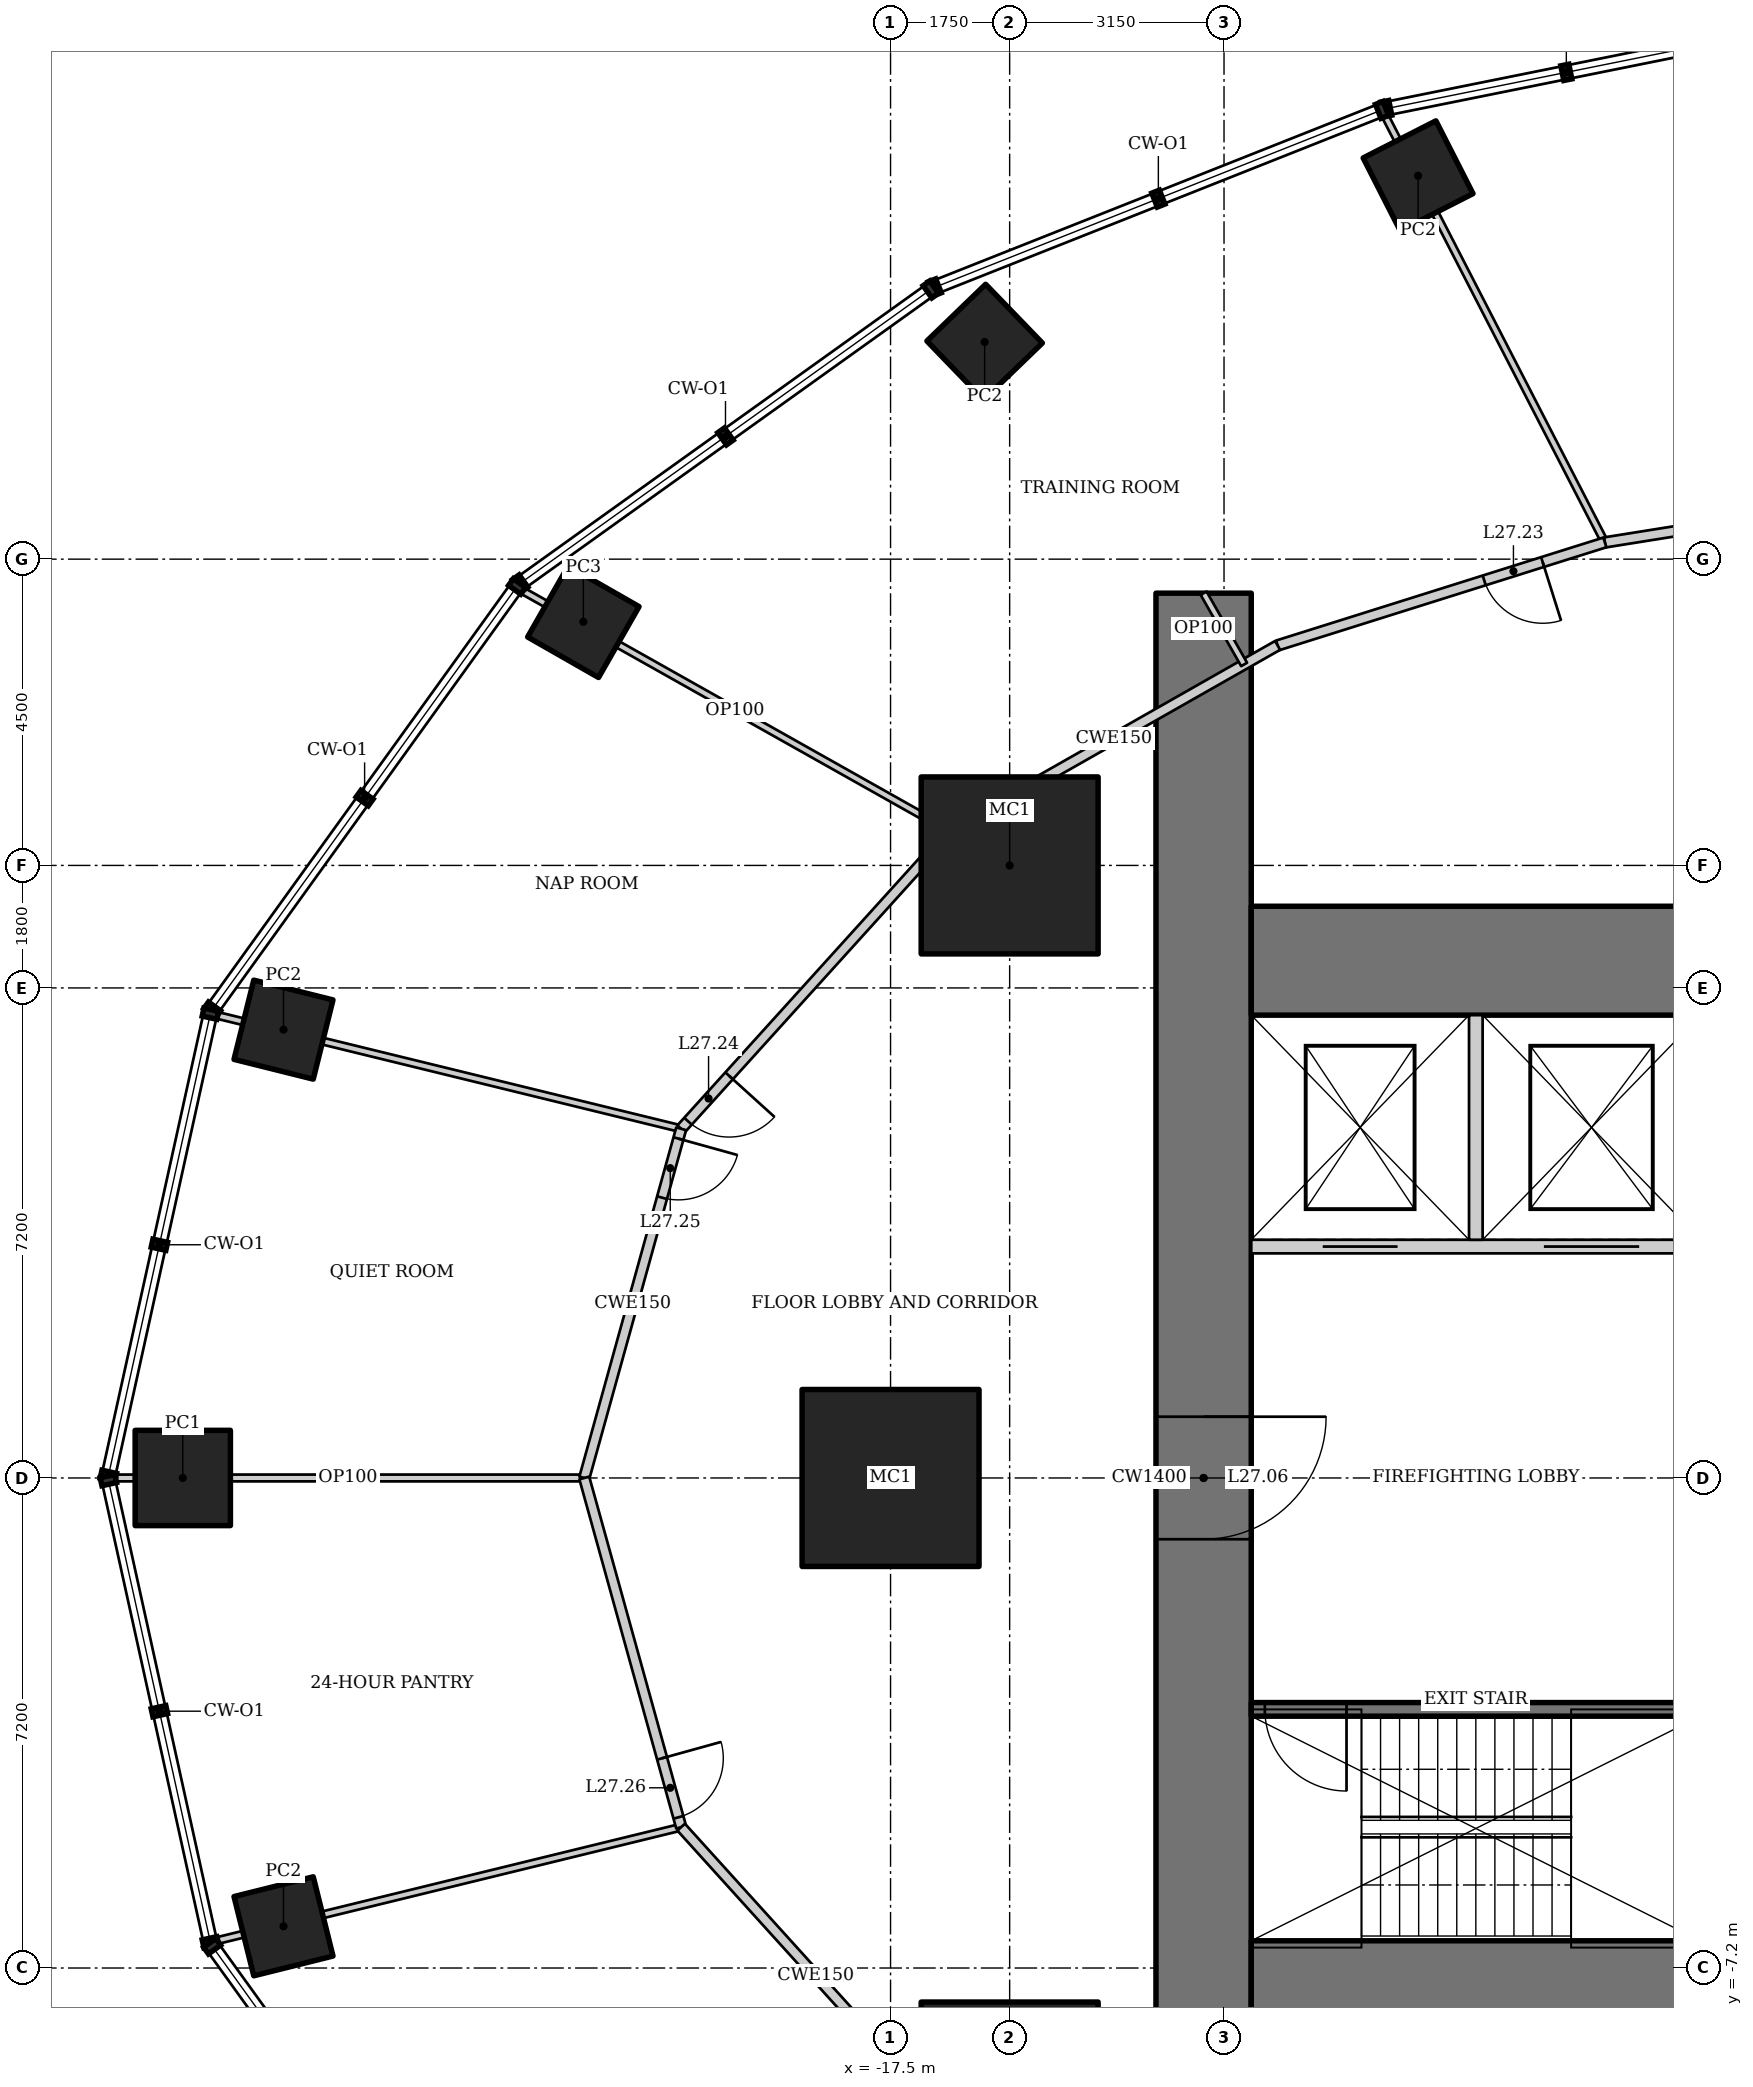
"""IFC4 building model, lengths in metres.
Left out: names, types, materials, properties, quantities, classifications, styles, units other than length and angle.
Written with IfcOpenShell. Run it as: python <this file> out.ifc"""

import sys

from ifc_helpers import new_model, si_unit, direction, frame, frame_2d, origin, origin_2d, place, context, subcontext, project, spatial, rectangle, hollow_rectangle, extrude, element, fill, save


model = new_model("IFC4")
c1 = context("Model", 3, precision=1e-05, world=origin(), true_north=direction((0.0, 1.0)))
c2 = subcontext(c1, "Body", "Model", "MODEL_VIEW")
j1 = project(units=[si_unit("LENGTHUNIT", "METRE"), si_unit("PLANEANGLEUNIT", "RADIAN")], contexts=[c1])
p1 = place(None, origin())
s1 = spatial("IfcSite", under=j1, at=p1, CompositionType="ELEMENT")
p2 = place(p1, origin())
s2 = spatial("IfcBuilding", under=s1, at=p2, CompositionType="ELEMENT")
p3 = place(p2, frame((0.0, 0.0, 117.4)))
s3 = spatial("IfcBuildingStorey", under=s2, at=p3, CompositionType="ELEMENT", Elevation=117.4)
for number, where, z_axis, x_axis in (
    (1, (-15.75, 9.0, 0.0), (0.0, 0.0, 1.0), (1.0, 0.0, 0.0)),
    (2, (-17.5, 0.0, 0.0), (0.0, 0.0, 1.0), (1.0, 0.0, 0.0)),
    (3, (-15.75, -9.0, 0.0), (0.0, 0.0, 1.0), (1.0, 0.0, 0.0)),
):
    element("IfcColumn", number, at=place(p3, frame(where, z_axis=z_axis, x_axis=x_axis)), inside=s3, PredefinedType="COLUMN", context=c2, shape_type="SweptSolid", body=[
        extrude(hollow_rectangle(XDim=2.6, YDim=2.6, WallThickness=0.13, at=origin_2d()), origin(), (0.0, 0.0, 1.0), 4.2),
    ])
for number, where, z_axis, x_axis in (
    (4, (-9.749, 19.133, 0.0), (0.0, 0.0, 1.0), (0.891, 0.454, 0.0)),
    (5, (-16.118, 16.69, 0.0), (0.0, 0.0, 1.0), (0.719, 0.695, 0.0)),
):
    element("IfcColumn", number, at=place(p3, frame(where, z_axis=z_axis, x_axis=x_axis)), inside=s3, PredefinedType="COLUMN", context=c2, shape_type="SweptSolid", body=[
        extrude(hollow_rectangle(XDim=1.2, YDim=1.2, WallThickness=0.1, at=origin_2d()), origin(), (0.0, 0.0, 1.0), 4.2),
    ])
p4 = place(p3, frame((-22.014, 12.579, 0.0), z_axis=(0.0, 0.0, 1.0), x_axis=(0.496139221777, 0.86824298017, 0.0)))
e6 = element("IfcColumn", 6, at=p4, inside=s3, PredefinedType="COLUMN", context=c2, shape_type="SweptSolid", body=[
    extrude(hollow_rectangle(XDim=1.2, YDim=1.2, WallThickness=0.12, at=origin_2d()), origin(), (0.0, 0.0, 1.0), 4.2),
])
p5 = place(p3, frame((-26.42, 6.587, 0.0), z_axis=(0.0, 0.0, 1.0), x_axis=(0.2419218956, 0.970295726276, 0.0)))
e7 = element("IfcColumn", 7, at=p5, inside=s3, PredefinedType="COLUMN", context=c2, shape_type="SweptSolid", body=[
    extrude(hollow_rectangle(XDim=1.2, YDim=1.2, WallThickness=0.1, at=origin_2d()), origin(), (0.0, 0.0, 1.0), 4.2),
])
p6 = place(p3, frame((-27.9, 0.0, 0.0), z_axis=(0.0, 0.0, 1.0), x_axis=(1.0, 0.0, 0.0)))
e8 = element("IfcColumn", 8, at=p6, inside=s3, PredefinedType="COLUMN", context=c2, shape_type="SweptSolid", body=[
    extrude(hollow_rectangle(XDim=1.4, YDim=1.4, WallThickness=0.1, at=origin_2d()), origin(), (0.0, 0.0, 1.0), 4.2),
])
p7 = place(p3, frame((-26.42, -6.587, 0.0), z_axis=(0.0, 0.0, 1.0), x_axis=(0.970295726276, 0.2419218956, 0.0)))
e9 = element("IfcColumn", 9, at=p7, inside=s3, PredefinedType="COLUMN", context=c2, shape_type="SweptSolid", body=[
    extrude(hollow_rectangle(XDim=1.2, YDim=1.2, WallThickness=0.1, at=origin_2d()), origin(), (0.0, 0.0, 1.0), 4.2),
])
p8 = place(p3, frame((-12.9, 13.0, 0.0), z_axis=(0.0, 0.0, 1.0), x_axis=(0.0, -1.0, 0.0)))
e10 = element("IfcWall", 10, at=p8, inside=s3, PredefinedType="SHEAR", context=c2, shape_type="SweptSolid", body=[
    extrude(rectangle(XDim=26.0, YDim=1.4, at=frame_2d((13.0, 0.0))), origin(), (0.0, 0.0, 1.0), 4.2),
])
p9 = place(p8, frame((12.1, 0.0, 0.0)))
e11 = element("IfcOpeningElement", 11, at=p9, cuts=e10, PredefinedType="OPENING", context=c2, shape_type="SweptSolid", body=[
    extrude(rectangle(XDim=1.8, YDim=2.1, at=frame_2d((0.9, 1.05))), frame((0.0, 0.71, 0.0), z_axis=(0.0, -1.0, 0.0), x_axis=(1.0, 0.0, 0.0)), (0.0, 0.0, 1.0), 1.42),
])
for number, where, z_axis, x_axis in (
    (12, (-12.2, -7.6, 0.0), (0.0, 0.0, 1.0), (1.0, 0.0, 0.0)),
    (13, (12.2, 7.6, 0.0), (0.0, 0.0, 1.0), (-1.0, 0.0, 0.0)),
):
    element("IfcWall", number, at=place(p3, frame(where, z_axis=z_axis, x_axis=x_axis)), inside=s3, PredefinedType="SHEAR", context=c2, shape_type="SweptSolid", body=[
        extrude(rectangle(XDim=24.4, YDim=1.6, at=frame_2d((12.2, 0.0))), origin(), (0.0, 0.0, 1.0), 4.2),
    ])
p10 = place(p3, frame((-5.6, -3.4, 0.0), z_axis=(0.0, 0.0, 1.0), x_axis=(-1.0, 0.0, 0.0)))
e14 = element("IfcWall", 14, at=p10, inside=s3, PredefinedType="SHEAR", context=c2, shape_type="SweptSolid", body=[
    extrude(rectangle(XDim=6.6, YDim=0.2, at=frame_2d((3.3, 0.0))), origin(), (0.0, 0.0, 1.0), 4.2),
])
p11 = place(p10, frame((5.2, 0.0, 0.0)))
e15 = element("IfcOpeningElement", 15, at=p11, cuts=e14, PredefinedType="OPENING", context=c2, shape_type="SweptSolid", body=[
    extrude(rectangle(XDim=1.2, YDim=2.1, at=frame_2d((0.6, 1.05))), frame((0.0, 0.11, 0.0), z_axis=(0.0, -1.0, 0.0), x_axis=(1.0, 0.0, 0.0)), (0.0, 0.0, 1.0), 0.22),
])
p12 = place(p3, frame((-12.2, 3.4, 0.0), z_axis=(0.0, 0.0, 1.0), x_axis=(1.0, 0.0, 0.0)))
e16 = element("IfcWall", 16, at=p12, inside=s3, PredefinedType="SOLIDWALL", context=c2, shape_type="SweptSolid", body=[
    extrude(rectangle(XDim=6.6, YDim=0.2, at=frame_2d((3.3, 0.0))), origin(), (0.0, 0.0, 1.0), 4.2),
])
p13 = place(p12, frame((1.05, 0.0, 0.0)))
e17 = element("IfcOpeningElement", 17, at=p13, cuts=e16, PredefinedType="OPENING", context=c2, shape_type="SweptSolid", body=[
    extrude(rectangle(XDim=1.1, YDim=2.2, at=frame_2d((0.55, 1.1))), frame((0.0, 0.11, 0.0), z_axis=(0.0, -1.0, 0.0), x_axis=(1.0, 0.0, 0.0)), (0.0, 0.0, 1.0), 0.22),
])
p14 = place(p12, frame((4.3, 0.0, 0.0)))
e18 = element("IfcOpeningElement", 18, at=p14, cuts=e16, PredefinedType="OPENING", context=c2, shape_type="SweptSolid", body=[
    extrude(rectangle(XDim=1.4, YDim=2.2, at=frame_2d((0.7, 1.1))), frame((0.0, 0.11, 0.0), z_axis=(0.0, -1.0, 0.0), x_axis=(1.0, 0.0, 0.0)), (0.0, 0.0, 1.0), 0.22),
])
p15 = place(p3, frame((-8.9, 3.5, 0.0), z_axis=(0.0, 0.0, 1.0), x_axis=(0.0, 1.0, 0.0)))
e19 = element("IfcWall", 19, at=p15, inside=s3, PredefinedType="SOLIDWALL", context=c2, shape_type="SweptSolid", body=[
    extrude(rectangle(XDim=3.3, YDim=0.2, at=frame_2d((1.65, 0.0))), origin(), (0.0, 0.0, 1.0), 4.2),
])
p16 = place(p3, frame((-10.253, 20.052, 0.0), z_axis=(0.0, 0.0, 1.0), x_axis=(0.458082677592, -0.888909590729, 0.0)))
e20 = element("IfcWall", 20, at=p16, inside=s3, PredefinedType="PARTITIONING", context=c2, shape_type="SweptSolid", body=[
    extrude(rectangle(XDim=7.094, YDim=0.1, at=frame_2d((3.547, 0.0))), origin(), (0.0, 0.0, 1.0), 3.349),
])
p17 = place(p3, frame((-22.949, 13.059, 0.0), z_axis=(0.0, 0.0, 1.0), x_axis=(0.871483913002, -0.490424091352, 0.0)))
e21 = element("IfcWall", 21, at=p17, inside=s3, PredefinedType="PARTITIONING", context=c2, shape_type="SweptSolid", body=[
    extrude(rectangle(XDim=7.26, YDim=0.1, at=frame_2d((3.63, 0.0))), origin(), (0.0, 0.0, 1.0), 3.451),
])
p18 = place(p3, frame((-27.441, 6.809, 0.0), z_axis=(0.0, 0.0, 1.0), x_axis=(0.971377572955, -0.237540755996, 0.0)))
e22 = element("IfcWall", 22, at=p18, inside=s3, PredefinedType="PARTITIONING", context=c2, shape_type="SweptSolid", body=[
    extrude(rectangle(XDim=7.066, YDim=0.1, at=frame_2d((3.533, 0.0))), origin(), (0.0, 0.0, 1.0), 3.113),
])
p19 = place(p3, frame((-28.944, 0.0, 0.0), z_axis=(0.0, 0.0, 1.0), x_axis=(1.0, 0.0, 0.0)))
e23 = element("IfcWall", 23, at=p19, inside=s3, PredefinedType="PARTITIONING", context=c2, shape_type="SweptSolid", body=[
    extrude(rectangle(XDim=6.944, YDim=0.1, at=frame_2d((3.472, 0.0))), origin(), (0.0, 0.0, 1.0), 3.204),
])
p20 = place(p3, frame((-27.441, -6.809, 0.0), z_axis=(0.0, 0.0, 1.0), x_axis=(0.971377572955, 0.237540755996, 0.0)))
e24 = element("IfcWall", 24, at=p20, inside=s3, PredefinedType="PARTITIONING", context=c2, shape_type="SweptSolid", body=[
    extrude(rectangle(XDim=7.066, YDim=0.1, at=frame_2d((3.533, 0.0))), origin(), (0.0, 0.0, 1.0), 3.113),
])
p21 = place(p3, frame((-3.31, 14.335, 0.0), z_axis=(0.0, 0.0, 1.0), x_axis=(-0.987511396594, -0.157547585181, 0.0)))
e25 = element("IfcWall", 25, at=p21, inside=s3, PredefinedType="PARTITIONING", context=c2, shape_type="SweptSolid", body=[
    extrude(rectangle(XDim=3.741, YDim=0.15, at=frame_2d((1.87, 0.0))), origin(), (0.0, 0.0, 1.0), 4.05),
])
p22 = place(p3, frame((-7.004, 13.746, 0.0), z_axis=(0.0, 0.0, 1.0), x_axis=(-0.953893934057, -0.300143903101, 0.0)))
e26 = element("IfcWall", 26, at=p22, inside=s3, PredefinedType="PARTITIONING", context=c2, shape_type="SweptSolid", body=[
    extrude(rectangle(XDim=5.042, YDim=0.15, at=frame_2d((2.521, 0.0))), origin(), (0.0, 0.0, 1.0), 4.05),
])
p23 = place(p22, frame((0.959, 0.0, 0.0)))
e27 = element("IfcOpeningElement", 27, at=p23, cuts=e26, PredefinedType="OPENING", context=c2, shape_type="SweptSolid", body=[
    extrude(rectangle(XDim=0.9, YDim=2.1, at=frame_2d((0.45, 1.05))), frame((0.0, 0.085, 0.0), z_axis=(0.0, -1.0, 0.0), x_axis=(1.0, 0.0, 0.0)), (0.0, 0.0, 1.0), 0.17),
])
p24 = place(p3, frame((-11.813, 12.232, 0.0), z_axis=(0.0, 0.0, 1.0), x_axis=(-0.869375991036, -0.494151177485, 0.0)))
e28 = element("IfcWall", 28, at=p24, inside=s3, PredefinedType="PARTITIONING", context=c2, shape_type="SweptSolid", body=[
    extrude(rectangle(XDim=5.532, YDim=0.15, at=frame_2d((2.766, 0.0))), origin(), (0.0, 0.0, 1.0), 4.05),
])
p25 = place(p3, frame((-16.623, 9.499, 0.0), z_axis=(0.0, 0.0, 1.0), x_axis=(-0.671118353743, -0.741350224435, 0.0)))
e29 = element("IfcWall", 29, at=p25, inside=s3, PredefinedType="PARTITIONING", context=c2, shape_type="SweptSolid", body=[
    extrude(rectangle(XDim=5.892, YDim=0.15, at=frame_2d((2.946, 0.0))), origin(), (0.0, 0.0, 1.0), 4.05),
])
p26 = place(p25, frame((4.842, 0.0, 0.0)))
e30 = element("IfcOpeningElement", 30, at=p26, cuts=e29, PredefinedType="OPENING", context=c2, shape_type="SweptSolid", body=[
    extrude(rectangle(XDim=0.9, YDim=2.1, at=frame_2d((0.45, 1.05))), frame((0.0, 0.085, 0.0), z_axis=(0.0, -1.0, 0.0), x_axis=(1.0, 0.0, 0.0)), (0.0, 0.0, 1.0), 0.17),
])
p27 = place(p3, frame((-20.577, 5.13, 0.0), z_axis=(0.0, 0.0, 1.0), x_axis=(-0.267293817428, -0.963615076244, 0.0)))
e31 = element("IfcWall", 31, at=p27, inside=s3, PredefinedType="PARTITIONING", context=c2, shape_type="SweptSolid", body=[
    extrude(rectangle(XDim=5.324, YDim=0.15, at=frame_2d((2.662, 0.0))), origin(), (0.0, 0.0, 1.0), 4.05),
])
p28 = place(p27, frame((0.15, 0.0, 0.0)))
e32 = element("IfcOpeningElement", 32, at=p28, cuts=e31, PredefinedType="OPENING", context=c2, shape_type="SweptSolid", body=[
    extrude(rectangle(XDim=0.9, YDim=2.1, at=frame_2d((0.45, 1.05))), frame((0.0, 0.085, 0.0), z_axis=(0.0, -1.0, 0.0), x_axis=(1.0, 0.0, 0.0)), (0.0, 0.0, 1.0), 0.17),
])
p29 = place(p3, frame((-22.0, 0.0, 0.0), z_axis=(0.0, 0.0, 1.0), x_axis=(0.267293817428, -0.963615076244, 0.0)))
e33 = element("IfcWall", 33, at=p29, inside=s3, PredefinedType="PARTITIONING", context=c2, shape_type="SweptSolid", body=[
    extrude(rectangle(XDim=5.324, YDim=0.15, at=frame_2d((2.662, 0.0))), origin(), (0.0, 0.0, 1.0), 4.05),
])
p30 = place(p29, frame((4.274, 0.0, 0.0)))
e34 = element("IfcOpeningElement", 34, at=p30, cuts=e33, PredefinedType="OPENING", context=c2, shape_type="SweptSolid", body=[
    extrude(rectangle(XDim=0.9, YDim=2.1, at=frame_2d((0.45, 1.05))), frame((0.0, 0.085, 0.0), z_axis=(0.0, -1.0, 0.0), x_axis=(1.0, 0.0, 0.0)), (0.0, 0.0, 1.0), 0.17),
])
p31 = place(p3, frame((-20.577, -5.13, 0.0), z_axis=(0.0, 0.0, 1.0), x_axis=(0.671118353743, -0.741350224435, 0.0)))
e35 = element("IfcWall", 35, at=p31, inside=s3, PredefinedType="PARTITIONING", context=c2, shape_type="SweptSolid", body=[
    extrude(rectangle(XDim=5.892, YDim=0.15, at=frame_2d((2.946, 0.0))), origin(), (0.0, 0.0, 1.0), 4.05),
])
p32 = place(p3, frame((-12.9, 13.0, 0.0), z_axis=(0.0, 0.0, 1.0), x_axis=(0.494173075358, -0.869363543974, 0.0)))
e36 = element("IfcWall", 36, at=p32, inside=s3, PredefinedType="PARTITIONING", context=c2, shape_type="SweptSolid", body=[
    extrude(rectangle(XDim=1.204, YDim=0.1, at=frame_2d((0.602, 0.0))), origin(), (0.0, 0.0, 1.0), 4.05),
])
p33 = place(p11, origin())
e37 = element("IfcDoor", 37, at=p33, inside=s3, OperationType="SINGLE_SWING_RIGHT", PredefinedType="DOOR", context=c2, shape_type="SweptSolid", body=[
    extrude(rectangle(XDim=1.2, YDim=2.1, at=frame_2d((0.6, 1.05))), frame((0.0, 0.025, 0.0), z_axis=(0.0, -1.0, 0.0), x_axis=(1.0, 0.0, 0.0)), (0.0, 0.0, 1.0), 0.05),
])
fill(e15, e37)
p34 = place(p9, origin())
e38 = element("IfcDoor", 38, at=p34, inside=s3, OperationType="DOUBLE_DOOR_DOUBLE_SWING", PredefinedType="DOOR", context=c2, shape_type="SweptSolid", body=[
    extrude(rectangle(XDim=1.8, YDim=2.1, at=frame_2d((0.9, 1.05))), frame((0.0, 0.025, 0.0), z_axis=(0.0, -1.0, 0.0), x_axis=(1.0, 0.0, 0.0)), (0.0, 0.0, 1.0), 0.05),
])
fill(e11, e38)
p35 = place(p13, origin())
e39 = element("IfcDoor", 39, at=p35, inside=s3, OperationType="DOUBLE_DOOR_SLIDING", PredefinedType="DOOR", context=c2, shape_type="SweptSolid", body=[
    extrude(rectangle(XDim=1.1, YDim=2.2, at=frame_2d((0.55, 1.1))), frame((0.0, 0.025, 0.0), z_axis=(0.0, -1.0, 0.0), x_axis=(1.0, 0.0, 0.0)), (0.0, 0.0, 1.0), 0.05),
])
fill(e17, e39)
p36 = place(p14, origin())
e40 = element("IfcDoor", 40, at=p36, inside=s3, OperationType="DOUBLE_DOOR_SLIDING", PredefinedType="DOOR", context=c2, shape_type="SweptSolid", body=[
    extrude(rectangle(XDim=1.4, YDim=2.2, at=frame_2d((0.7, 1.1))), frame((0.0, 0.025, 0.0), z_axis=(0.0, -1.0, 0.0), x_axis=(1.0, 0.0, 0.0)), (0.0, 0.0, 1.0), 0.05),
])
fill(e18, e40)
p37 = place(p23, origin())
e41 = element("IfcDoor", 41, at=p37, inside=s3, OperationType="SINGLE_SWING_LEFT", PredefinedType="DOOR", context=c2, shape_type="SweptSolid", body=[
    extrude(rectangle(XDim=0.9, YDim=2.1, at=frame_2d((0.45, 1.05))), frame((0.0, 0.025, 0.0), z_axis=(0.0, -1.0, 0.0), x_axis=(1.0, 0.0, 0.0)), (0.0, 0.0, 1.0), 0.05),
])
fill(e27, e41)
p38 = place(p26, origin())
e42 = element("IfcDoor", 42, at=p38, inside=s3, OperationType="SINGLE_SWING_LEFT", PredefinedType="DOOR", context=c2, shape_type="SweptSolid", body=[
    extrude(rectangle(XDim=0.9, YDim=2.1, at=frame_2d((0.45, 1.05))), frame((0.0, 0.025, 0.0), z_axis=(0.0, -1.0, 0.0), x_axis=(1.0, 0.0, 0.0)), (0.0, 0.0, 1.0), 0.05),
])
fill(e30, e42)
p39 = place(p28, origin())
e43 = element("IfcDoor", 43, at=p39, inside=s3, OperationType="SINGLE_SWING_LEFT", PredefinedType="DOOR", context=c2, shape_type="SweptSolid", body=[
    extrude(rectangle(XDim=0.9, YDim=2.1, at=frame_2d((0.45, 1.05))), frame((0.0, 0.025, 0.0), z_axis=(0.0, -1.0, 0.0), x_axis=(1.0, 0.0, 0.0)), (0.0, 0.0, 1.0), 0.05),
])
fill(e32, e43)
p40 = place(p30, origin())
e44 = element("IfcDoor", 44, at=p40, inside=s3, OperationType="SINGLE_SWING_LEFT", PredefinedType="DOOR", context=c2, shape_type="SweptSolid", body=[
    extrude(rectangle(XDim=0.9, YDim=2.1, at=frame_2d((0.45, 1.05))), frame((0.0, 0.025, 0.0), z_axis=(0.0, -1.0, 0.0), x_axis=(1.0, 0.0, 0.0)), (0.0, 0.0, 1.0), 0.05),
])
fill(e34, e44)
save(model, sys.argv[1])
